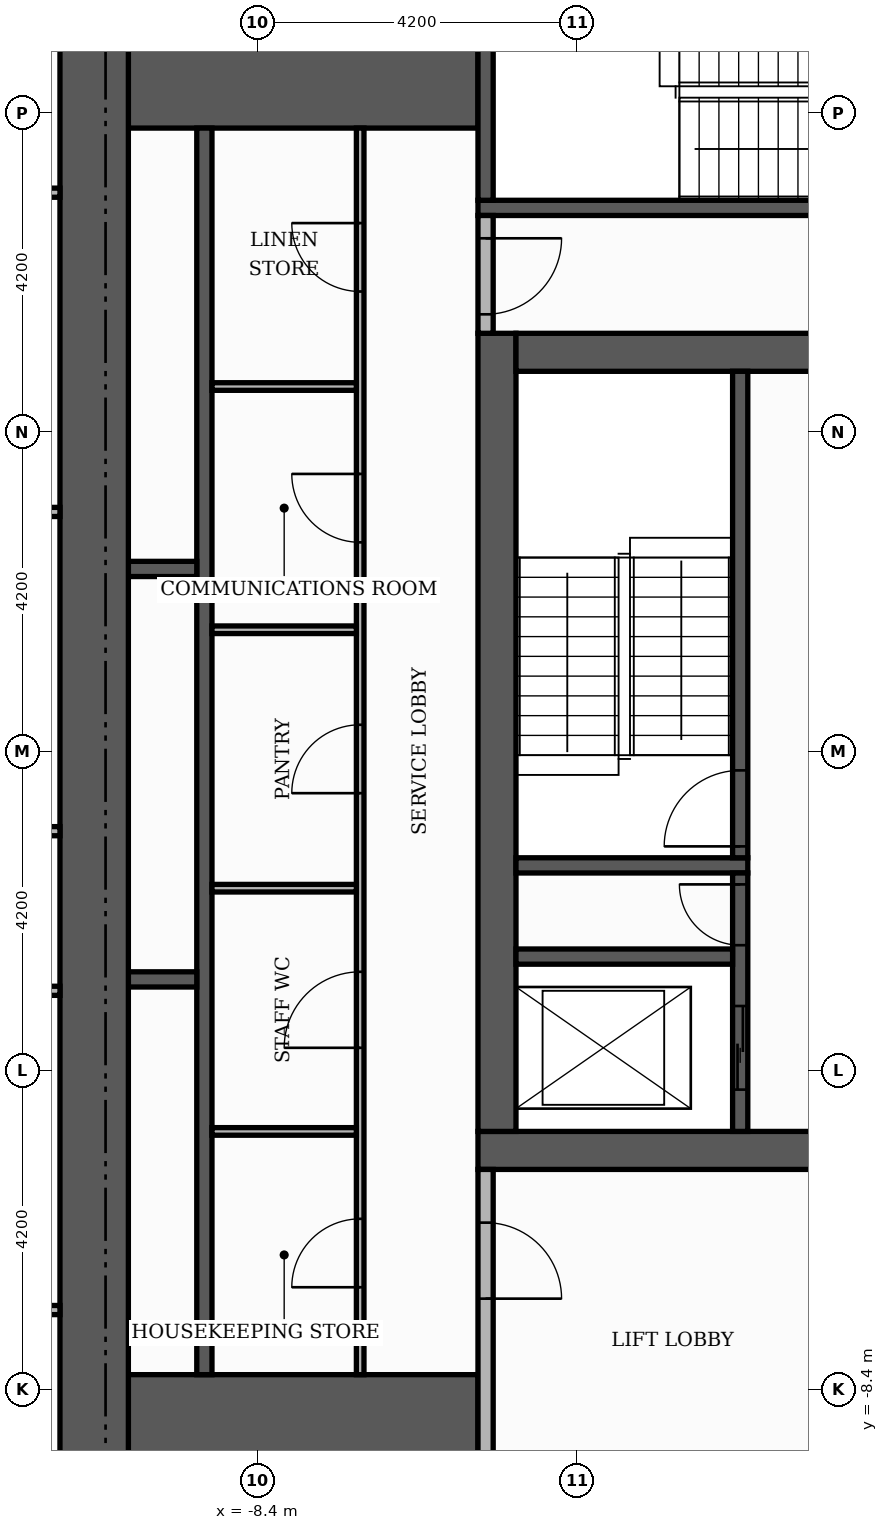
"""IFC4 building model, lengths in metres.
Left out: names, types, materials, properties, quantities, classifications, styles, units other than length and angle.
Written with IfcOpenShell. Run it as: python <this file> out.ifc"""

import sys

from ifc_helpers import new_model, si_unit, direction, frame, frame_2d, origin, place, context, subcontext, project, spatial, rectangle, extrude, element, fill, save


model = new_model("IFC4")
c1 = context("Model", 3, precision=1e-05, world=origin(), true_north=direction((0.0, 1.0)))
c2 = subcontext(c1, "Body", "Model", "MODEL_VIEW")
j1 = project(units=[si_unit("LENGTHUNIT", "METRE"), si_unit("PLANEANGLEUNIT", "RADIAN")], contexts=[c1])
p1 = place(None, origin())
s1 = spatial("IfcSite", under=j1, at=p1, CompositionType="ELEMENT")
p2 = place(p1, origin())
s2 = spatial("IfcBuilding", under=s1, at=p2, CompositionType="ELEMENT")
p3 = place(p2, frame((0.0, 0.0, 172.8)))
s3 = spatial("IfcBuildingStorey", under=s2, at=p3, CompositionType="ELEMENT", Elevation=172.8)
p4 = place(p3, frame((-5.5, -5.25, 0.0), z_axis=(0.0, 0.0, 1.0), x_axis=(1.0, 0.0, 0.0)))
e1 = element("IfcWall", 1, at=p4, inside=s3, PredefinedType="SHEAR", context=c2, shape_type="SweptSolid", body=[
    extrude(rectangle(XDim=11.0, YDim=0.5, at=frame_2d((5.5, 0.0))), origin(), (0.0, 0.0, 1.0), 3.48),
])
p5 = place(p4, frame((4.9, 0.0, 0.0)))
e2 = element("IfcOpeningElement", 2, at=p5, cuts=e1, PredefinedType="OPENING", context=c2, shape_type="SweptSolid", body=[
    extrude(rectangle(XDim=1.2, YDim=2.1, at=frame_2d((0.6, 1.05))), frame((0.0, 0.26, 0.0), z_axis=(0.0, -1.0, 0.0), x_axis=(1.0, 0.0, 0.0)), (0.0, 0.0, 1.0), 0.52),
])
p6 = place(p3, frame((-5.25, -5.0, 0.0), z_axis=(0.0, 0.0, 1.0), x_axis=(0.0, 1.0, 0.0)))
e3 = element("IfcWall", 3, at=p6, inside=s3, PredefinedType="SHEAR", context=c2, shape_type="SweptSolid", body=[
    extrude(rectangle(XDim=10.5, YDim=0.5, at=frame_2d((5.25, 0.0))), origin(), (0.0, 0.0, 1.0), 3.48),
])
p7 = place(p3, frame((-5.0, 5.25, 0.0), z_axis=(0.0, 0.0, 1.0), x_axis=(1.0, 0.0, 0.0)))
e4 = element("IfcWall", 4, at=p7, inside=s3, PredefinedType="SHEAR", context=c2, shape_type="SweptSolid", body=[
    extrude(rectangle(XDim=10.0, YDim=0.5, at=frame_2d((5.0, 0.0))), origin(), (0.0, 0.0, 1.0), 3.48),
])
p8 = place(p7, frame((4.4, 0.0, 0.0)))
e5 = element("IfcOpeningElement", 5, at=p8, cuts=e4, PredefinedType="OPENING", context=c2, shape_type="SweptSolid", body=[
    extrude(rectangle(XDim=1.2, YDim=2.1, at=frame_2d((0.6, 1.05))), frame((0.0, 0.26, 0.0), z_axis=(0.0, -1.0, 0.0), x_axis=(1.0, 0.0, 0.0)), (0.0, 0.0, 1.0), 0.52),
])
for number, where, z_axis, x_axis in (
    (6, (-10.1, -9.15, 0.0), (0.0, 0.0, 1.0), (1.0, 0.0, 0.0)),
    (7, (-10.1, 9.15, 0.0), (0.0, 0.0, 1.0), (1.0, 0.0, 0.0)),
):
    element("IfcWall", number, at=place(p3, frame(where, z_axis=z_axis, x_axis=x_axis)), inside=s3, PredefinedType="SHEAR", context=c2, shape_type="SweptSolid", body=[
        extrude(rectangle(XDim=4.6, YDim=1.9, at=frame_2d((2.3, 0.0))), origin(), (0.0, 0.0, 1.0), 3.48),
    ])
p9 = place(p3, frame((-5.0, -1.5, 0.0), z_axis=(0.0, 0.0, 1.0), x_axis=(1.0, 0.0, 0.0)))
e8 = element("IfcWall", 8, at=p9, inside=s3, PredefinedType="SHEAR", context=c2, shape_type="SweptSolid", body=[
    extrude(rectangle(XDim=3.05, YDim=0.2, at=frame_2d((1.525, 0.0))), origin(), (0.0, 0.0, 1.0), 3.48),
])
p10 = place(p3, frame((-2.05, -1.4, 0.0), z_axis=(0.0, 0.0, 1.0), x_axis=(0.0, 1.0, 0.0)))
e9 = element("IfcWall", 9, at=p10, inside=s3, PredefinedType="SHEAR", context=c2, shape_type="SweptSolid", body=[
    extrude(rectangle(XDim=6.4, YDim=0.2, at=frame_2d((3.2, 0.0))), origin(), (0.0, 0.0, 1.0), 3.48),
])
p11 = place(p10, frame((0.15, 0.0, 0.0)))
e10 = element("IfcOpeningElement", 10, at=p11, cuts=e9, PredefinedType="OPENING", context=c2, shape_type="SweptSolid", body=[
    extrude(rectangle(XDim=1.0, YDim=2.1, at=frame_2d((0.5, 1.05))), frame((0.0, 0.11, 0.0), z_axis=(0.0, -1.0, 0.0), x_axis=(1.0, 0.0, 0.0)), (0.0, 0.0, 1.0), 0.22),
])
p12 = place(p3, frame((-5.5, 7.15, 0.0), z_axis=(0.0, 0.0, 1.0), x_axis=(1.0, 0.0, 0.0)))
e11 = element("IfcWall", 11, at=p12, inside=s3, PredefinedType="SHEAR", context=c2, shape_type="SweptSolid", body=[
    extrude(rectangle(XDim=6.8, YDim=0.2, at=frame_2d((3.4, 0.0))), origin(), (0.0, 0.0, 1.0), 3.48),
])
p13 = place(p3, frame((-5.4, 7.25, 0.0), z_axis=(0.0, 0.0, 1.0), x_axis=(0.0, 1.0, 0.0)))
e12 = element("IfcWall", 12, at=p13, inside=s3, PredefinedType="SHEAR", context=c2, shape_type="SweptSolid", body=[
    extrude(rectangle(XDim=2.85, YDim=0.2, at=frame_2d((1.425, 0.0))), origin(), (0.0, 0.0, 1.0), 3.48),
])
p14 = place(p3, frame((-9.1, -8.2, 0.0), z_axis=(0.0, 0.0, 1.0), x_axis=(0.0, 1.0, 0.0)))
e13 = element("IfcWall", 13, at=p14, inside=s3, PredefinedType="SHEAR", context=c2, shape_type="SweptSolid", body=[
    extrude(rectangle(XDim=16.4, YDim=0.2, at=frame_2d((8.2, 0.0))), origin(), (0.0, 0.0, 1.0), 3.48),
])
p15 = place(p3, frame((-2.05, -5.0, 0.0), z_axis=(0.0, 0.0, 1.0), x_axis=(0.0, 1.0, 0.0)))
e14 = element("IfcWall", 14, at=p15, inside=s3, PredefinedType="SHEAR", context=c2, shape_type="SweptSolid", body=[
    extrude(rectangle(XDim=3.4, YDim=0.2, at=frame_2d((1.7, 0.0))), origin(), (0.0, 0.0, 1.0), 3.48),
])
p16 = place(p15, frame((0.55, 0.0, 0.0)))
e15 = element("IfcOpeningElement", 15, at=p16, cuts=e14, PredefinedType="OPENING", context=c2, shape_type="SweptSolid", body=[
    extrude(rectangle(XDim=1.1, YDim=2.1, at=frame_2d((0.55, 1.05))), frame((0.0, 0.11, 0.0), z_axis=(0.0, -1.0, 0.0), x_axis=(1.0, 0.0, 0.0)), (0.0, 0.0, 1.0), 0.22),
])
p17 = place(p15, frame((2.45, 0.0, 0.0)))
e16 = element("IfcOpeningElement", 16, at=p17, cuts=e14, PredefinedType="OPENING", context=c2, shape_type="SweptSolid", body=[
    extrude(rectangle(XDim=0.8, YDim=2.1, at=frame_2d((0.4, 1.05))), frame((0.0, 0.11, 0.0), z_axis=(0.0, -1.0, 0.0), x_axis=(1.0, 0.0, 0.0)), (0.0, 0.0, 1.0), 0.22),
])
p18 = place(p3, frame((-10.1, -3.0, 0.0), z_axis=(0.0, 0.0, 1.0), x_axis=(1.0, 0.0, 0.0)))
e17 = element("IfcWall", 17, at=p18, inside=s3, PredefinedType="SHEAR", context=c2, shape_type="SweptSolid", body=[
    extrude(rectangle(XDim=0.9, YDim=0.2, at=frame_2d((0.45, 0.0))), origin(), (0.0, 0.0, 1.0), 3.48),
])
p19 = place(p3, frame((-5.0, -2.7, 0.0), z_axis=(0.0, 0.0, 1.0), x_axis=(1.0, 0.0, 0.0)))
e18 = element("IfcWall", 18, at=p19, inside=s3, PredefinedType="SHEAR", context=c2, shape_type="SweptSolid", body=[
    extrude(rectangle(XDim=2.85, YDim=0.2, at=frame_2d((1.425, 0.0))), origin(), (0.0, 0.0, 1.0), 3.48),
])
p20 = place(p3, frame((-10.1, 2.4, 0.0), z_axis=(0.0, 0.0, 1.0), x_axis=(1.0, 0.0, 0.0)))
e19 = element("IfcWall", 19, at=p20, inside=s3, PredefinedType="SHEAR", context=c2, shape_type="SweptSolid", body=[
    extrude(rectangle(XDim=0.9, YDim=0.2, at=frame_2d((0.45, 0.0))), origin(), (0.0, 0.0, 1.0), 3.48),
])
p21 = place(p3, frame((-10.55, -10.1, 0.0), z_axis=(0.0, 0.0, 1.0), x_axis=(0.0, 1.0, 0.0)))
e20 = element("IfcWall", 20, at=p21, inside=s3, PredefinedType="SHEAR", context=c2, shape_type="SweptSolid", body=[
    extrude(rectangle(XDim=20.2, YDim=0.9, at=frame_2d((10.1, 0.0))), origin(), (0.0, 0.0, 1.0), 3.48),
])
p22 = place(p3, frame((-5.4, -10.1, 0.0), z_axis=(0.0, 0.0, 1.0), x_axis=(0.0, 1.0, 0.0)))
e21 = element("IfcWall", 21, at=p22, inside=s3, PredefinedType="PARTITIONING", context=c2, shape_type="SweptSolid", body=[
    extrude(rectangle(XDim=4.6, YDim=0.2, at=frame_2d((2.3, 0.0))), origin(), (0.0, 0.0, 1.0), 3.48),
])
p23 = place(p22, frame((2.9, 0.0, 0.0)))
e22 = element("IfcOpeningElement", 22, at=p23, cuts=e21, PredefinedType="OPENING", context=c2, shape_type="SweptSolid", body=[
    extrude(rectangle(XDim=1.0, YDim=2.1, at=frame_2d((0.5, 1.05))), frame((0.0, 0.11, 0.0), z_axis=(0.0, -1.0, 0.0), x_axis=(1.0, 0.0, 0.0)), (0.0, 0.0, 1.0), 0.22),
])
p24 = place(p3, frame((-7.05, -8.2, 0.0), z_axis=(0.0, 0.0, 1.0), x_axis=(0.0, 1.0, 0.0)))
e23 = element("IfcWall", 23, at=p24, inside=s3, PredefinedType="PARTITIONING", context=c2, shape_type="SweptSolid", body=[
    extrude(rectangle(XDim=16.4, YDim=0.1, at=frame_2d((8.2, 0.0))), origin(), (0.0, 0.0, 1.0), 3.48),
])
p25 = place(p24, frame((1.15, 0.0, 0.0)))
e24 = element("IfcOpeningElement", 24, at=p25, cuts=e23, PredefinedType="OPENING", context=c2, shape_type="SweptSolid", body=[
    extrude(rectangle(XDim=0.9, YDim=2.1, at=frame_2d((0.45, 1.05))), frame((0.0, 0.06, 0.0), z_axis=(0.0, -1.0, 0.0), x_axis=(1.0, 0.0, 0.0)), (0.0, 0.0, 1.0), 0.12),
])
p26 = place(p24, frame((4.3, 0.0, 0.0)))
e25 = element("IfcOpeningElement", 25, at=p26, cuts=e23, PredefinedType="OPENING", context=c2, shape_type="SweptSolid", body=[
    extrude(rectangle(XDim=1.0, YDim=2.1, at=frame_2d((0.5, 1.05))), frame((0.0, 0.06, 0.0), z_axis=(0.0, -1.0, 0.0), x_axis=(1.0, 0.0, 0.0)), (0.0, 0.0, 1.0), 0.12),
])
p27 = place(p24, frame((7.65, 0.0, 0.0)))
e26 = element("IfcOpeningElement", 26, at=p27, cuts=e23, PredefinedType="OPENING", context=c2, shape_type="SweptSolid", body=[
    extrude(rectangle(XDim=0.9, YDim=2.1, at=frame_2d((0.45, 1.05))), frame((0.0, 0.06, 0.0), z_axis=(0.0, -1.0, 0.0), x_axis=(1.0, 0.0, 0.0)), (0.0, 0.0, 1.0), 0.12),
])
p28 = place(p24, frame((10.95, 0.0, 0.0)))
e27 = element("IfcOpeningElement", 27, at=p28, cuts=e23, PredefinedType="OPENING", context=c2, shape_type="SweptSolid", body=[
    extrude(rectangle(XDim=0.9, YDim=2.1, at=frame_2d((0.45, 1.05))), frame((0.0, 0.06, 0.0), z_axis=(0.0, -1.0, 0.0), x_axis=(1.0, 0.0, 0.0)), (0.0, 0.0, 1.0), 0.12),
])
p29 = place(p24, frame((14.25, 0.0, 0.0)))
e28 = element("IfcOpeningElement", 28, at=p29, cuts=e23, PredefinedType="OPENING", context=c2, shape_type="SweptSolid", body=[
    extrude(rectangle(XDim=0.9, YDim=2.1, at=frame_2d((0.45, 1.05))), frame((0.0, 0.06, 0.0), z_axis=(0.0, -1.0, 0.0), x_axis=(1.0, 0.0, 0.0)), (0.0, 0.0, 1.0), 0.12),
])
for number, where, z_axis, x_axis in (
    (29, (-9.0, -5.0, 0.0), (0.0, 0.0, 1.0), (1.0, 0.0, 0.0)),
    (30, (-9.0, -1.8, 0.0), (0.0, 0.0, 1.0), (1.0, 0.0, 0.0)),
    (31, (-9.0, 1.6, 0.0), (0.0, 0.0, 1.0), (1.0, 0.0, 0.0)),
    (32, (-9.0, 4.8, 0.0), (0.0, 0.0, 1.0), (1.0, 0.0, 0.0)),
):
    element("IfcWall", number, at=place(p3, frame(where, z_axis=z_axis, x_axis=x_axis)), inside=s3, PredefinedType="PARTITIONING", context=c2, shape_type="SweptSolid", body=[
        extrude(rectangle(XDim=1.9, YDim=0.1, at=frame_2d((0.95, 0.0))), origin(), (0.0, 0.0, 1.0), 3.48),
    ])
p30 = place(p3, frame((-5.4, 5.5, 0.0), z_axis=(0.0, 0.0, 1.0), x_axis=(0.0, 1.0, 0.0)))
e33 = element("IfcWall", 33, at=p30, inside=s3, PredefinedType="PARTITIONING", context=c2, shape_type="SweptSolid", body=[
    extrude(rectangle(XDim=1.55, YDim=0.2, at=frame_2d((0.775, 0.0))), origin(), (0.0, 0.0, 1.0), 3.48),
])
p31 = place(p30, frame((0.25, 0.0, 0.0)))
e34 = element("IfcOpeningElement", 34, at=p31, cuts=e33, PredefinedType="OPENING", context=c2, shape_type="SweptSolid", body=[
    extrude(rectangle(XDim=1.0, YDim=2.1, at=frame_2d((0.5, 1.05))), frame((0.0, 0.11, 0.0), z_axis=(0.0, -1.0, 0.0), x_axis=(1.0, 0.0, 0.0)), (0.0, 0.0, 1.0), 0.22),
])
for number, where, z_axis, x_axis in (
    (35, (-19.22, -7.35, 0.0), (0.0, 0.0, 1.0), (1.0, 0.0, 0.0)),
    (36, (-19.22, -3.15, 0.0), (0.0, 0.0, 1.0), (1.0, 0.0, 0.0)),
    (37, (-19.22, -1.05, 0.0), (0.0, 0.0, 1.0), (1.0, 0.0, 0.0)),
    (38, (-19.22, 3.15, 0.0), (0.0, 0.0, 1.0), (1.0, 0.0, 0.0)),
):
    element("IfcWall", number, at=place(p3, frame(where, z_axis=z_axis, x_axis=x_axis)), inside=s3, PredefinedType="PARTITIONING", context=c2, shape_type="SweptSolid", body=[
        extrude(rectangle(XDim=8.22, YDim=0.12, at=frame_2d((4.11, 0.0))), origin(), (0.0, 0.0, 1.0), 3.48),
    ])
p32 = place(p3, frame((-19.22, 7.35, 0.0), z_axis=(0.0, 0.0, 1.0), x_axis=(1.0, 0.0, 0.0)))
e39 = element("IfcWall", 39, at=p32, inside=s3, PredefinedType="PARTITIONING", context=c2, shape_type="SweptSolid", body=[
    extrude(rectangle(XDim=8.22, YDim=0.12, at=frame_2d((4.11, 0.0))), origin(), (0.0, 0.0, 1.0), 3.48),
])
p33 = place(p32, frame((3.66, 0.0, 0.0)))
e40 = element("IfcOpeningElement", 40, at=p33, cuts=e39, PredefinedType="OPENING", context=c2, shape_type="SweptSolid", body=[
    extrude(rectangle(XDim=0.9, YDim=2.1, at=frame_2d((0.45, 1.05))), frame((0.0, 0.07, 0.0), z_axis=(0.0, -1.0, 0.0), x_axis=(1.0, 0.0, 0.0)), (0.0, 0.0, 1.0), 0.14),
])
p34 = place(p16, origin())
e41 = element("IfcDoor", 41, at=p34, inside=s3, OperationType="SLIDING_TO_LEFT", PredefinedType="DOOR", context=c2, shape_type="SweptSolid", body=[
    extrude(rectangle(XDim=1.1, YDim=2.1, at=frame_2d((0.55, 1.05))), frame((0.0, 0.025, 0.0), z_axis=(0.0, -1.0, 0.0), x_axis=(1.0, 0.0, 0.0)), (0.0, 0.0, 1.0), 0.05),
])
fill(e15, e41)
p35 = place(p11, origin())
e42 = element("IfcDoor", 42, at=p35, inside=s3, OperationType="SINGLE_SWING_LEFT", PredefinedType="DOOR", context=c2, shape_type="SweptSolid", body=[
    extrude(rectangle(XDim=1.0, YDim=2.1, at=frame_2d((0.5, 1.05))), frame((0.0, 0.025, 0.0), z_axis=(0.0, -1.0, 0.0), x_axis=(1.0, 0.0, 0.0)), (0.0, 0.0, 1.0), 0.05),
])
fill(e10, e42)
p36 = place(p17, origin())
e43 = element("IfcDoor", 43, at=p36, inside=s3, OperationType="SINGLE_SWING_RIGHT", PredefinedType="DOOR", context=c2, shape_type="SweptSolid", body=[
    extrude(rectangle(XDim=0.8, YDim=2.1, at=frame_2d((0.4, 1.05))), frame((0.0, 0.025, 0.0), z_axis=(0.0, -1.0, 0.0), x_axis=(1.0, 0.0, 0.0)), (0.0, 0.0, 1.0), 0.05),
])
fill(e16, e43)
p37 = place(p31, frame((1.0, 0.0, 0.0), z_axis=(0.0, 0.0, 1.0), x_axis=(-1.0, 0.0, 0.0)))
e44 = element("IfcDoor", 44, at=p37, inside=s3, OperationType="SINGLE_SWING_RIGHT", PredefinedType="DOOR", context=c2, shape_type="SweptSolid", body=[
    extrude(rectangle(XDim=1.0, YDim=2.1, at=frame_2d((0.5, 1.05))), frame((0.0, 0.025, 0.0), z_axis=(0.0, -1.0, 0.0), x_axis=(1.0, 0.0, 0.0)), (0.0, 0.0, 1.0), 0.05),
])
fill(e34, e44)
p38 = place(p23, frame((1.0, 0.0, 0.0), z_axis=(0.0, 0.0, 1.0), x_axis=(-1.0, 0.0, 0.0)))
e45 = element("IfcDoor", 45, at=p38, inside=s3, OperationType="SINGLE_SWING_LEFT", PredefinedType="DOOR", context=c2, shape_type="SweptSolid", body=[
    extrude(rectangle(XDim=1.0, YDim=2.1, at=frame_2d((0.5, 1.05))), frame((0.0, 0.025, 0.0), z_axis=(0.0, -1.0, 0.0), x_axis=(1.0, 0.0, 0.0)), (0.0, 0.0, 1.0), 0.05),
])
fill(e22, e45)
p39 = place(p25, origin())
e46 = element("IfcDoor", 46, at=p39, inside=s3, OperationType="SINGLE_SWING_LEFT", PredefinedType="DOOR", context=c2, shape_type="SweptSolid", body=[
    extrude(rectangle(XDim=0.9, YDim=2.1, at=frame_2d((0.45, 1.05))), frame((0.0, 0.025, 0.0), z_axis=(0.0, -1.0, 0.0), x_axis=(1.0, 0.0, 0.0)), (0.0, 0.0, 1.0), 0.05),
])
fill(e24, e46)
p40 = place(p26, origin())
e47 = element("IfcDoor", 47, at=p40, inside=s3, OperationType="SINGLE_SWING_LEFT", PredefinedType="DOOR", context=c2, shape_type="SweptSolid", body=[
    extrude(rectangle(XDim=1.0, YDim=2.1, at=frame_2d((0.5, 1.05))), frame((0.0, 0.025, 0.0), z_axis=(0.0, -1.0, 0.0), x_axis=(1.0, 0.0, 0.0)), (0.0, 0.0, 1.0), 0.05),
])
fill(e25, e47)
p41 = place(p27, origin())
e48 = element("IfcDoor", 48, at=p41, inside=s3, OperationType="SINGLE_SWING_LEFT", PredefinedType="DOOR", context=c2, shape_type="SweptSolid", body=[
    extrude(rectangle(XDim=0.9, YDim=2.1, at=frame_2d((0.45, 1.05))), frame((0.0, 0.025, 0.0), z_axis=(0.0, -1.0, 0.0), x_axis=(1.0, 0.0, 0.0)), (0.0, 0.0, 1.0), 0.05),
])
fill(e26, e48)
p42 = place(p28, origin())
e49 = element("IfcDoor", 49, at=p42, inside=s3, OperationType="SINGLE_SWING_RIGHT", PredefinedType="DOOR", context=c2, shape_type="SweptSolid", body=[
    extrude(rectangle(XDim=0.9, YDim=2.1, at=frame_2d((0.45, 1.05))), frame((0.0, 0.025, 0.0), z_axis=(0.0, -1.0, 0.0), x_axis=(1.0, 0.0, 0.0)), (0.0, 0.0, 1.0), 0.05),
])
fill(e27, e49)
p43 = place(p29, origin())
e50 = element("IfcDoor", 50, at=p43, inside=s3, OperationType="SINGLE_SWING_RIGHT", PredefinedType="DOOR", context=c2, shape_type="SweptSolid", body=[
    extrude(rectangle(XDim=0.9, YDim=2.1, at=frame_2d((0.45, 1.05))), frame((0.0, 0.025, 0.0), z_axis=(0.0, -1.0, 0.0), x_axis=(1.0, 0.0, 0.0)), (0.0, 0.0, 1.0), 0.05),
])
fill(e28, e50)
save(model, sys.argv[1])
